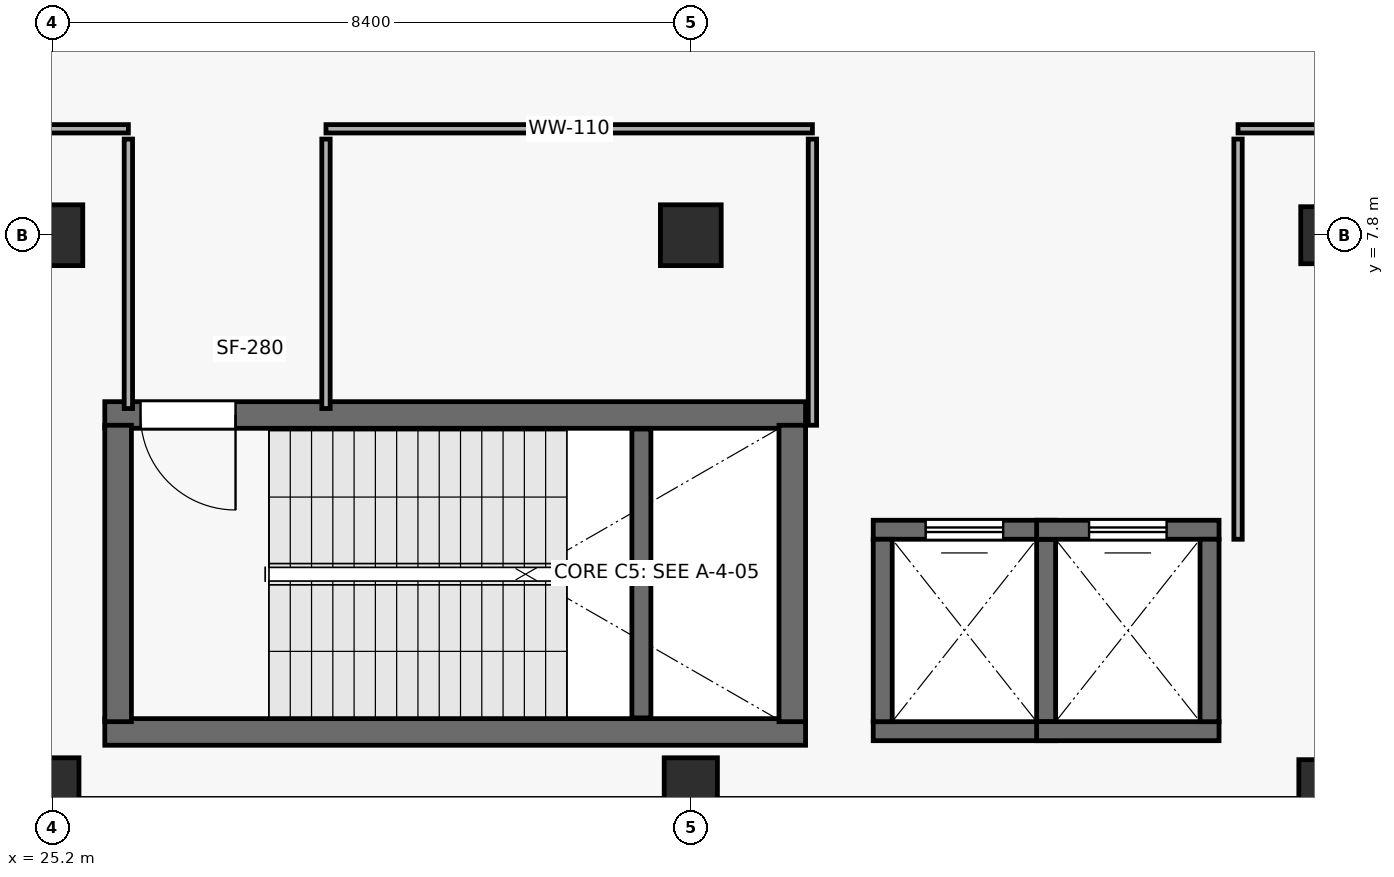
"""IFC4 building model, lengths in metres.
Left out: names, types, materials, properties, quantities, classifications, styles, units other than length and angle.
Written with IfcOpenShell. Run it as: python <this file> out.ifc"""

import sys

from ifc_helpers import new_model, si_unit, direction, frame, frame_2d, origin, origin_2d, place, context, subcontext, project, spatial, rectangle, extrude, element, fill, save


model = new_model("IFC4")
c1 = context("Model", 3, precision=1e-05, world=origin(), true_north=direction((0.0, 1.0)))
c2 = subcontext(c1, "Body", "Model", "MODEL_VIEW")
j1 = project(units=[si_unit("LENGTHUNIT", "METRE"), si_unit("PLANEANGLEUNIT", "RADIAN")], contexts=[c1])
p1 = place(None, origin())
s1 = spatial("IfcSite", under=j1, at=p1, CompositionType="ELEMENT")
p2 = place(p1, origin())
s2 = spatial("IfcBuilding", under=s1, at=p2, CompositionType="ELEMENT")
p3 = place(p2, origin())
s3 = spatial("IfcBuildingStorey", under=s2, at=p3, CompositionType="ELEMENT", Elevation=0.0)
p4 = place(p3, frame((25.2, 0.5, 0.0), z_axis=(0.0, 0.0, 1.0), x_axis=(1.0, 0.0, 0.0)))
e1 = element("IfcColumn", 1, at=p4, inside=s3, PredefinedType="COLUMN", context=c2, shape_type="SweptSolid", body=[
    extrude(rectangle(XDim=0.7, YDim=0.85, at=origin_2d()), origin(), (0.0, 0.0, 1.0), 5.4),
])
p5 = place(p3, frame((25.2, 7.8, 0.0), z_axis=(0.0, 0.0, 1.0), x_axis=(1.0, 0.0, 0.0)))
e2 = element("IfcColumn", 2, at=p5, inside=s3, PredefinedType="COLUMN", context=c2, shape_type="SweptSolid", body=[
    extrude(rectangle(XDim=0.8, YDim=0.8, at=origin_2d()), origin(), (0.0, 0.0, 1.0), 5.4),
])
p6 = place(p3, frame((33.6, 0.5, 0.0), z_axis=(0.0, 0.0, 1.0), x_axis=(1.0, 0.0, 0.0)))
e3 = element("IfcColumn", 3, at=p6, inside=s3, PredefinedType="COLUMN", context=c2, shape_type="SweptSolid", body=[
    extrude(rectangle(XDim=0.7, YDim=0.85, at=origin_2d()), origin(), (0.0, 0.0, 1.0), 5.4),
])
for number, where, z_axis, x_axis in (
    (4, (33.6, 7.8, 0.0), (0.0, 0.0, 1.0), (1.0, 0.0, 0.0)),
    (5, (42.0, 0.5, 0.0), (0.0, 0.0, 1.0), (1.0, 0.0, 0.0)),
):
    element("IfcColumn", number, at=place(p3, frame(where, z_axis=z_axis, x_axis=x_axis)), inside=s3, PredefinedType="COLUMN", context=c2, shape_type="SweptSolid", body=[
        extrude(rectangle(XDim=0.8, YDim=0.8, at=origin_2d()), origin(), (0.0, 0.0, 1.0), 5.4),
    ])
p7 = place(p3, frame((42.0, 7.8, 0.0), z_axis=(0.0, 0.0, 1.0), x_axis=(1.0, 0.0, 0.0)))
e6 = element("IfcColumn", 6, at=p7, inside=s3, PredefinedType="COLUMN", context=c2, shape_type="SweptSolid", body=[
    extrude(rectangle(XDim=0.75, YDim=0.75, at=origin_2d()), origin(), (0.0, 0.0, 1.0), 5.4),
])
p8 = place(p3, frame((25.89, 1.265, 0.0), z_axis=(0.0, 0.0, 1.0), x_axis=(1.0, 0.0, 0.0)))
e7 = element("IfcWall", 7, at=p8, inside=s3, PredefinedType="SHEAR", context=c2, shape_type="SweptSolid", body=[
    extrude(rectangle(XDim=9.22, YDim=0.35, at=frame_2d((4.61, 0.0))), origin(), (0.0, 0.0, 1.0), 5.12),
])
p9 = place(p3, frame((35.11, 5.435, 0.0), z_axis=(0.0, 0.0, 1.0), x_axis=(-1.0, 0.0, 0.0)))
e8 = element("IfcWall", 8, at=p9, inside=s3, PredefinedType="SHEAR", context=c2, shape_type="SweptSolid", body=[
    extrude(rectangle(XDim=9.22, YDim=0.35, at=frame_2d((4.61, 0.0))), origin(), (0.0, 0.0, 1.0), 5.12),
])
p10 = place(p9, frame((7.5, 0.0, 0.0)))
e9 = element("IfcOpeningElement", 9, at=p10, cuts=e8, PredefinedType="OPENING", context=c2, shape_type="SweptSolid", body=[
    extrude(rectangle(XDim=1.25, YDim=2.2, at=frame_2d((0.625, 1.1))), frame((0.0, 0.185, 0.0), z_axis=(0.0, -1.0, 0.0), x_axis=(1.0, 0.0, 0.0)), (0.0, 0.0, 1.0), 0.37),
])
for number, where, z_axis, x_axis in (
    (10, (26.065, 1.4, 0.0), (0.0, 0.0, 1.0), (0.0, 1.0, 0.0)),
    (11, (34.935, 5.3, 0.0), (0.0, 0.0, 1.0), (0.0, -1.0, 0.0)),
):
    element("IfcWall", number, at=place(p3, frame(where, z_axis=z_axis, x_axis=x_axis)), inside=s3, PredefinedType="SHEAR", context=c2, shape_type="SweptSolid", body=[
        extrude(rectangle(XDim=3.9, YDim=0.35, at=frame_2d((1.95, 0.0))), origin(), (0.0, 0.0, 1.0), 5.12),
    ])
p11 = place(p3, frame((32.95, 1.45, 0.0), z_axis=(0.0, 0.0, 1.0), x_axis=(0.0, 1.0, 0.0)))
e12 = element("IfcWall", 12, at=p11, inside=s3, PredefinedType="SHEAR", context=c2, shape_type="SweptSolid", body=[
    extrude(rectangle(XDim=3.8, YDim=0.25, at=frame_2d((1.9, 0.0))), origin(), (0.0, 0.0, 1.0), 2.52),
])
p12 = place(p3, frame((36.0, 1.275, 0.0), z_axis=(0.0, 0.0, 1.0), x_axis=(1.0, 0.0, 0.0)))
e13 = element("IfcWall", 13, at=p12, inside=s3, PredefinedType="SHEAR", context=c2, shape_type="SweptSolid", body=[
    extrude(rectangle(XDim=2.4, YDim=0.25, at=frame_2d((1.2, 0.0))), origin(), (0.0, 0.0, 1.0), 5.12),
])
p13 = place(p3, frame((38.4, 3.925, 0.0), z_axis=(0.0, 0.0, 1.0), x_axis=(-1.0, 0.0, 0.0)))
e14 = element("IfcWall", 14, at=p13, inside=s3, PredefinedType="SHEAR", context=c2, shape_type="SweptSolid", body=[
    extrude(rectangle(XDim=2.4, YDim=0.25, at=frame_2d((1.2, 0.0))), origin(), (0.0, 0.0, 1.0), 5.12),
])
p14 = place(p13, frame((0.69, 0.0, 0.0)))
e15 = element("IfcOpeningElement", 15, at=p14, cuts=e14, PredefinedType="OPENING", context=c2, shape_type="SweptSolid", body=[
    extrude(rectangle(XDim=1.02, YDim=2.15, at=frame_2d((0.51, 1.075))), frame((0.0, 0.135, 0.0), z_axis=(0.0, -1.0, 0.0), x_axis=(1.0, 0.0, 0.0)), (0.0, 0.0, 1.0), 0.27),
])
for number, where, z_axis, x_axis in (
    (16, (36.125, 1.4, 0.0), (0.0, 0.0, 1.0), (0.0, 1.0, 0.0)),
    (17, (38.275, 3.8, 0.0), (0.0, 0.0, 1.0), (0.0, -1.0, 0.0)),
    (18, (38.15, 1.275, 0.0), (0.0, 0.0, 1.0), (1.0, 0.0, 0.0)),
):
    element("IfcWall", number, at=place(p3, frame(where, z_axis=z_axis, x_axis=x_axis)), inside=s3, PredefinedType="SHEAR", context=c2, shape_type="SweptSolid", body=[
        extrude(rectangle(XDim=2.4, YDim=0.25, at=frame_2d((1.2, 0.0))), origin(), (0.0, 0.0, 1.0), 5.12),
    ])
p15 = place(p3, frame((40.55, 3.925, 0.0), z_axis=(0.0, 0.0, 1.0), x_axis=(-1.0, 0.0, 0.0)))
e19 = element("IfcWall", 19, at=p15, inside=s3, PredefinedType="SHEAR", context=c2, shape_type="SweptSolid", body=[
    extrude(rectangle(XDim=2.4, YDim=0.25, at=frame_2d((1.2, 0.0))), origin(), (0.0, 0.0, 1.0), 5.12),
])
p16 = place(p15, frame((0.69, 0.0, 0.0)))
e20 = element("IfcOpeningElement", 20, at=p16, cuts=e19, PredefinedType="OPENING", context=c2, shape_type="SweptSolid", body=[
    extrude(rectangle(XDim=1.02, YDim=2.15, at=frame_2d((0.51, 1.075))), frame((0.0, 0.135, 0.0), z_axis=(0.0, -1.0, 0.0), x_axis=(1.0, 0.0, 0.0)), (0.0, 0.0, 1.0), 0.27),
])
p17 = place(p3, frame((40.425, 3.8, 0.0), z_axis=(0.0, 0.0, 1.0), x_axis=(0.0, -1.0, 0.0)))
e21 = element("IfcWall", 21, at=p17, inside=s3, PredefinedType="SHEAR", context=c2, shape_type="SweptSolid", body=[
    extrude(rectangle(XDim=2.4, YDim=0.25, at=frame_2d((1.2, 0.0))), origin(), (0.0, 0.0, 1.0), 5.12),
])
p18 = place(p3, frame((40.8, 9.2, 0.0), z_axis=(0.0, 0.0, 1.0), x_axis=(1.0, 0.0, 0.0)))
e22 = element("IfcWall", 22, at=p18, inside=s3, PredefinedType="PARTITIONING", context=c2, shape_type="SweptSolid", body=[
    extrude(rectangle(XDim=35.4, YDim=0.11, at=frame_2d((17.7, 0.0))), origin(), (0.0, 0.0, 1.0), 5.12),
])
p19 = place(p3, frame((4.8, 9.2, 0.0), z_axis=(0.0, 0.0, 1.0), x_axis=(1.0, 0.0, 0.0)))
e23 = element("IfcWall", 23, at=p19, inside=s3, PredefinedType="PARTITIONING", context=c2, shape_type="SweptSolid", body=[
    extrude(rectangle(XDim=21.4, YDim=0.11, at=frame_2d((10.7, 0.0))), origin(), (0.0, 0.0, 1.0), 5.12),
])
p20 = place(p3, frame((28.8, 9.2, 0.0), z_axis=(0.0, 0.0, 1.0), x_axis=(1.0, 0.0, 0.0)))
e24 = element("IfcWall", 24, at=p20, inside=s3, PredefinedType="PARTITIONING", context=c2, shape_type="SweptSolid", body=[
    extrude(rectangle(XDim=6.4, YDim=0.11, at=frame_2d((3.2, 0.0))), origin(), (0.0, 0.0, 1.0), 5.12),
])
p21 = place(p3, frame((35.2, 9.065, 0.0), z_axis=(0.0, 0.0, 1.0), x_axis=(0.0, -1.0, 0.0)))
e25 = element("IfcWall", 25, at=p21, inside=s3, PredefinedType="PARTITIONING", context=c2, shape_type="SweptSolid", body=[
    extrude(rectangle(XDim=3.765, YDim=0.11, at=frame_2d((1.882, 0.0))), origin(), (0.0, 0.0, 1.0), 5.12),
])
p22 = place(p3, frame((40.8, 3.8, 0.0), z_axis=(0.0, 0.0, 1.0), x_axis=(0.0, 1.0, 0.0)))
e26 = element("IfcWall", 26, at=p22, inside=s3, PredefinedType="PARTITIONING", context=c2, shape_type="SweptSolid", body=[
    extrude(rectangle(XDim=5.265, YDim=0.11, at=frame_2d((2.632, 0.0))), origin(), (0.0, 0.0, 1.0), 5.12),
])
for number, where, z_axis, x_axis in (
    (27, (26.2, 9.065, 0.0), (0.0, 0.0, 1.0), (0.0, -1.0, 0.0)),
    (28, (28.8, 5.52, 0.0), (0.0, 0.0, 1.0), (0.0, 1.0, 0.0)),
):
    element("IfcWall", number, at=place(p3, frame(where, z_axis=z_axis, x_axis=x_axis)), inside=s3, PredefinedType="PARTITIONING", context=c2, shape_type="SweptSolid", body=[
        extrude(rectangle(XDim=3.545, YDim=0.11, at=frame_2d((1.772, 0.0))), origin(), (0.0, 0.0, 1.0), 5.12),
    ])
p23 = place(p10, origin())
e29 = element("IfcDoor", 29, at=p23, inside=s3, OperationType="SINGLE_SWING_LEFT", PredefinedType="DOOR", context=c2, shape_type="SweptSolid", body=[
    extrude(rectangle(XDim=1.25, YDim=2.2, at=frame_2d((0.625, 1.1))), frame((0.0, 0.025, 0.0), z_axis=(0.0, -1.0, 0.0), x_axis=(1.0, 0.0, 0.0)), (0.0, 0.0, 1.0), 0.05),
])
fill(e9, e29)
p24 = place(p14, origin())
e30 = element("IfcDoor", 30, at=p24, inside=s3, OperationType="SLIDING_TO_RIGHT", PredefinedType="DOOR", context=c2, shape_type="SweptSolid", body=[
    extrude(rectangle(XDim=1.02, YDim=2.15, at=frame_2d((0.51, 1.075))), frame((0.0, 0.025, 0.0), z_axis=(0.0, -1.0, 0.0), x_axis=(1.0, 0.0, 0.0)), (0.0, 0.0, 1.0), 0.05),
])
fill(e15, e30)
p25 = place(p16, origin())
e31 = element("IfcDoor", 31, at=p25, inside=s3, OperationType="SLIDING_TO_RIGHT", PredefinedType="DOOR", context=c2, shape_type="SweptSolid", body=[
    extrude(rectangle(XDim=1.02, YDim=2.15, at=frame_2d((0.51, 1.075))), frame((0.0, 0.025, 0.0), z_axis=(0.0, -1.0, 0.0), x_axis=(1.0, 0.0, 0.0)), (0.0, 0.0, 1.0), 0.05),
])
fill(e20, e31)
save(model, sys.argv[1])
